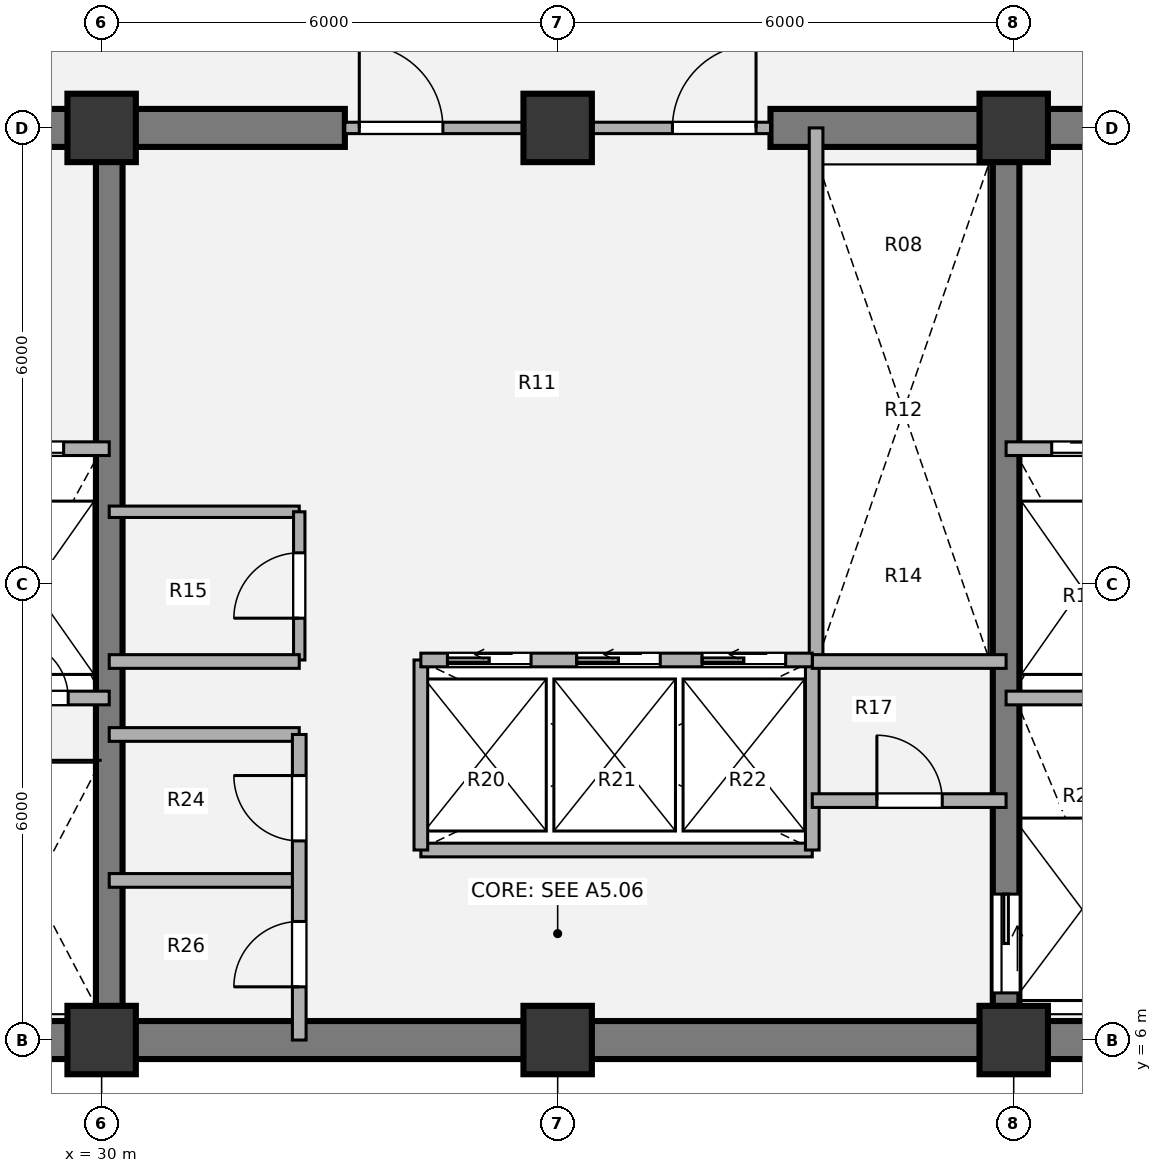
"""IFC4 building model, lengths in metres.
Left out: names, types, materials, properties, quantities, classifications, styles, units other than length and angle.
Written with IfcOpenShell. Run it as: python <this file> out.ifc"""

import sys

from ifc_helpers import new_model, si_unit, direction, frame, frame_2d, origin, origin_2d, place, context, subcontext, project, spatial, rectangle, extrude, source, transform, mapped, element, fill, save


model = new_model("IFC4")
c1 = context("Model", 3, precision=1e-05, world=origin(), true_north=direction((0.0, 1.0)))
c2 = subcontext(c1, "Body", "Model", "MODEL_VIEW")
j1 = project(units=[si_unit("LENGTHUNIT", "METRE"), si_unit("PLANEANGLEUNIT", "RADIAN")], contexts=[c1])
p1 = place(None, origin())
s1 = spatial("IfcSite", under=j1, at=p1, CompositionType="ELEMENT")
p2 = place(p1, origin())
s2 = spatial("IfcBuilding", under=s1, at=p2, CompositionType="ELEMENT")
p3 = place(p2, frame((0.0, 0.0, 120.06)))
s3 = spatial("IfcBuildingStorey", under=s2, at=p3, CompositionType="ELEMENT", Elevation=120.06)
m1 = source(origin(), c2, "Body", "SweptSolid", [
    extrude(rectangle(XDim=0.9, YDim=0.9, at=origin_2d()), origin(), (0.0, 0.0, 1.0), 3.78),
])
for number, where, z_axis, x_axis in (
    (1, (30.0, 6.0, 0.0), (0.0, 0.0, 1.0), (1.0, 0.0, 0.0)),
    (2, (36.0, 6.0, 0.0), (0.0, 0.0, 1.0), (1.0, 0.0, 0.0)),
    (3, (42.0, 6.0, 0.0), (0.0, 0.0, 1.0), (1.0, 0.0, 0.0)),
    (4, (30.0, 18.0, 0.0), (0.0, 0.0, 1.0), (1.0, 0.0, 0.0)),
    (5, (36.0, 18.0, 0.0), (0.0, 0.0, 1.0), (1.0, 0.0, 0.0)),
    (6, (42.0, 18.0, 0.0), (0.0, 0.0, 1.0), (1.0, 0.0, 0.0)),
):
    element("IfcColumn", number, at=place(p3, frame(where, z_axis=z_axis, x_axis=x_axis)), inside=s3, PredefinedType="COLUMN", context=c2, shape_type="MappedRepresentation", body=[
        mapped(m1, transform((0.0, 0.0, 0.0), x_axis=(1.0, 0.0, 0.0), y_axis=(0.0, 1.0, 0.0), z_axis=(0.0, 0.0, 1.0), scale=1.0)),
    ])
p4 = place(p3, frame((48.25, 6.0, 0.0), z_axis=(0.0, 0.0, 1.0), x_axis=(-1.0, 0.0, 0.0)))
e7 = element("IfcWall", 7, at=p4, inside=s3, PredefinedType="SHEAR", context=c2, shape_type="SweptSolid", body=[
    extrude(rectangle(XDim=24.5, YDim=0.5, at=frame_2d((12.25, 0.0))), origin(), (0.0, 0.0, 1.0), 3.78),
])
p5 = place(p3, frame((23.75, 18.0, 0.0), z_axis=(0.0, 0.0, 1.0), x_axis=(1.0, 0.0, 0.0)))
e8 = element("IfcWall", 8, at=p5, inside=s3, PredefinedType="SHEAR", context=c2, shape_type="SweptSolid", body=[
    extrude(rectangle(XDim=9.45, YDim=0.5, at=frame_2d((4.725, 0.0))), origin(), (0.0, 0.0, 1.0), 3.78),
])
p6 = place(p5, frame((2.95, 0.0, 0.0)))
e9 = element("IfcOpeningElement", 9, at=p6, cuts=e8, PredefinedType="OPENING", context=c2, shape_type="SweptSolid", body=[
    extrude(rectangle(XDim=1.1, YDim=2.1, at=origin_2d()), frame((0.55, 0.26, 1.05), z_axis=(0.0, -1.0, 0.0), x_axis=(1.0, 0.0, 0.0)), (0.0, 0.0, 1.0), 0.52),
])
p7 = place(p3, frame((38.8, 18.0, 0.0), z_axis=(0.0, 0.0, 1.0), x_axis=(1.0, 0.0, 0.0)))
e10 = element("IfcWall", 10, at=p7, inside=s3, PredefinedType="SHEAR", context=c2, shape_type="SweptSolid", body=[
    extrude(rectangle(XDim=9.45, YDim=0.5, at=frame_2d((4.725, 0.0))), origin(), (0.0, 0.0, 1.0), 3.78),
])
p8 = place(p7, frame((5.45, 0.0, 0.0)))
e11 = element("IfcOpeningElement", 11, at=p8, cuts=e10, PredefinedType="OPENING", context=c2, shape_type="SweptSolid", body=[
    extrude(rectangle(XDim=1.1, YDim=2.1, at=origin_2d()), frame((0.55, 0.26, 1.05), z_axis=(0.0, -1.0, 0.0), x_axis=(1.0, 0.0, 0.0)), (0.0, 0.0, 1.0), 0.52),
])
p9 = place(p3, frame((30.1, 6.0, 0.0), z_axis=(0.0, 0.0, 1.0), x_axis=(0.0, 1.0, 0.0)))
e12 = element("IfcWall", 12, at=p9, inside=s3, PredefinedType="SHEAR", context=c2, shape_type="SweptSolid", body=[
    extrude(rectangle(XDim=12.0, YDim=0.35, at=frame_2d((6.0, 0.0))), origin(), (0.0, 0.0, 1.0), 3.78),
])
p10 = place(p3, frame((41.9, 18.0, 0.0), z_axis=(0.0, 0.0, 1.0), x_axis=(0.0, -1.0, 0.0)))
e13 = element("IfcWall", 13, at=p10, inside=s3, PredefinedType="SHEAR", context=c2, shape_type="SweptSolid", body=[
    extrude(rectangle(XDim=12.0, YDim=0.35, at=frame_2d((6.0, 0.0))), origin(), (0.0, 0.0, 1.0), 3.78),
])
p11 = place(p10, frame((10.08, 0.0, 0.0)))
e14 = element("IfcOpeningElement", 14, at=p11, cuts=e13, PredefinedType="OPENING", context=c2, shape_type="SweptSolid", body=[
    extrude(rectangle(XDim=1.3, YDim=2.1, at=origin_2d()), frame((0.65, 0.185, 1.05), z_axis=(0.0, -1.0, 0.0), x_axis=(1.0, 0.0, 0.0)), (0.0, 0.0, 1.0), 0.37),
])
p12 = place(p3, frame((30.1, 12.95, 0.0), z_axis=(0.0, 0.0, 1.0), x_axis=(1.0, 0.0, 0.0)))
e15 = element("IfcWall", 15, at=p12, inside=s3, PredefinedType="PARTITIONING", context=c2, shape_type="SweptSolid", body=[
    extrude(rectangle(XDim=2.5, YDim=0.15, at=frame_2d((1.25, 0.0))), origin(), (0.0, 0.0, 1.0), 3.5),
])
p13 = place(p3, frame((32.6, 11.0, 0.0), z_axis=(0.0, 0.0, 1.0), x_axis=(0.0, 1.0, 0.0)))
e16 = element("IfcWall", 16, at=p13, inside=s3, PredefinedType="PARTITIONING", context=c2, shape_type="SweptSolid", body=[
    extrude(rectangle(XDim=1.95, YDim=0.15, at=frame_2d((0.975, 0.0))), origin(), (0.0, 0.0, 1.0), 3.5),
])
p14 = place(p13, frame((0.55, 0.0, 0.0)))
e17 = element("IfcOpeningElement", 17, at=p14, cuts=e16, PredefinedType="OPENING", context=c2, shape_type="SweptSolid", body=[
    extrude(rectangle(XDim=0.86, YDim=2.1, at=origin_2d()), frame((0.43, 0.085, 1.05), z_axis=(0.0, -1.0, 0.0), x_axis=(1.0, 0.0, 0.0)), (0.0, 0.0, 1.0), 0.17),
])
p15 = place(p3, frame((34.2, 8.5, 0.0), z_axis=(0.0, 0.0, 1.0), x_axis=(1.0, 0.0, 0.0)))
e18 = element("IfcWall", 18, at=p15, inside=s3, PredefinedType="PARTITIONING", context=c2, shape_type="SweptSolid", body=[
    extrude(rectangle(XDim=5.15, YDim=0.18, at=frame_2d((2.575, 0.0))), origin(), (0.0, 0.0, 1.0), 3.5),
])
for number, where, z_axis, x_axis in (
    (19, (34.2, 8.5, 0.0), (0.0, 0.0, 1.0), (0.0, 1.0, 0.0)),
    (20, (39.35, 8.5, 0.0), (0.0, 0.0, 1.0), (0.0, 1.0, 0.0)),
):
    element("IfcWall", number, at=place(p3, frame(where, z_axis=z_axis, x_axis=x_axis)), inside=s3, PredefinedType="PARTITIONING", context=c2, shape_type="SweptSolid", body=[
        extrude(rectangle(XDim=2.5, YDim=0.18, at=frame_2d((1.25, 0.0))), origin(), (0.0, 0.0, 1.0), 3.5),
    ])
p16 = place(p3, frame((39.4, 11.0, 0.0), z_axis=(0.0, 0.0, 1.0), x_axis=(0.0, 1.0, 0.0)))
e21 = element("IfcWall", 21, at=p16, inside=s3, PredefinedType="PARTITIONING", context=c2, shape_type="SweptSolid", body=[
    extrude(rectangle(XDim=7.0, YDim=0.18, at=frame_2d((3.5, 0.0))), origin(), (0.0, 0.0, 1.0), 3.5),
])
p17 = place(p3, frame((30.1, 10.98, 0.0), z_axis=(0.0, 0.0, 1.0), x_axis=(1.0, 0.0, 0.0)))
e22 = element("IfcWall", 22, at=p17, inside=s3, PredefinedType="PARTITIONING", context=c2, shape_type="SweptSolid", body=[
    extrude(rectangle(XDim=2.5, YDim=0.18, at=frame_2d((1.25, 0.0))), origin(), (0.0, 0.0, 1.0), 3.5),
])
p18 = place(p3, frame((39.35, 10.98, 0.0), z_axis=(0.0, 0.0, 1.0), x_axis=(1.0, 0.0, 0.0)))
e23 = element("IfcWall", 23, at=p18, inside=s3, PredefinedType="PARTITIONING", context=c2, shape_type="SweptSolid", body=[
    extrude(rectangle(XDim=2.55, YDim=0.18, at=frame_2d((1.275, 0.0))), origin(), (0.0, 0.0, 1.0), 3.5),
])
for number, where, z_axis, x_axis in (
    (24, (30.1, 8.1, 0.0), (0.0, 0.0, 1.0), (1.0, 0.0, 0.0)),
    (25, (30.1, 10.02, 0.0), (0.0, 0.0, 1.0), (1.0, 0.0, 0.0)),
):
    element("IfcWall", number, at=place(p3, frame(where, z_axis=z_axis, x_axis=x_axis)), inside=s3, PredefinedType="PARTITIONING", context=c2, shape_type="SweptSolid", body=[
        extrude(rectangle(XDim=2.5, YDim=0.18, at=frame_2d((1.25, 0.0))), origin(), (0.0, 0.0, 1.0), 3.5),
    ])
p19 = place(p3, frame((32.6, 6.0, 0.0), z_axis=(0.0, 0.0, 1.0), x_axis=(0.0, 1.0, 0.0)))
e26 = element("IfcWall", 26, at=p19, inside=s3, PredefinedType="PARTITIONING", context=c2, shape_type="SweptSolid", body=[
    extrude(rectangle(XDim=4.02, YDim=0.18, at=frame_2d((2.01, 0.0))), origin(), (0.0, 0.0, 1.0), 3.5),
])
p20 = place(p19, frame((0.7, 0.0, 0.0)))
e27 = element("IfcOpeningElement", 27, at=p20, cuts=e26, PredefinedType="OPENING", context=c2, shape_type="SweptSolid", body=[
    extrude(rectangle(XDim=0.86, YDim=2.1, at=origin_2d()), frame((0.43, 0.1, 1.05), z_axis=(0.0, -1.0, 0.0), x_axis=(1.0, 0.0, 0.0)), (0.0, 0.0, 1.0), 0.2),
])
p21 = place(p19, frame((2.62, 0.0, 0.0)))
e28 = element("IfcOpeningElement", 28, at=p21, cuts=e26, PredefinedType="OPENING", context=c2, shape_type="SweptSolid", body=[
    extrude(rectangle(XDim=0.86, YDim=2.1, at=origin_2d()), frame((0.43, 0.1, 1.05), z_axis=(0.0, -1.0, 0.0), x_axis=(1.0, 0.0, 0.0)), (0.0, 0.0, 1.0), 0.2),
])
p22 = place(p3, frame((39.35, 9.15, 0.0), z_axis=(0.0, 0.0, 1.0), x_axis=(1.0, 0.0, 0.0)))
e29 = element("IfcWall", 29, at=p22, inside=s3, PredefinedType="PARTITIONING", context=c2, shape_type="SweptSolid", body=[
    extrude(rectangle(XDim=2.55, YDim=0.18, at=frame_2d((1.275, 0.0))), origin(), (0.0, 0.0, 1.0), 3.5),
])
p23 = place(p22, frame((0.85, 0.0, 0.0)))
e30 = element("IfcOpeningElement", 30, at=p23, cuts=e29, PredefinedType="OPENING", context=c2, shape_type="SweptSolid", body=[
    extrude(rectangle(XDim=0.86, YDim=2.1, at=origin_2d()), frame((0.43, 0.1, 1.05), z_axis=(0.0, -1.0, 0.0), x_axis=(1.0, 0.0, 0.0)), (0.0, 0.0, 1.0), 0.2),
])
p24 = place(p3, frame((33.2, 18.0, 0.0), z_axis=(0.0, 0.0, 1.0), x_axis=(1.0, 0.0, 0.0)))
e31 = element("IfcWall", 31, at=p24, inside=s3, PredefinedType="PARTITIONING", context=c2, shape_type="SweptSolid", body=[
    extrude(rectangle(XDim=5.6, YDim=0.15, at=frame_2d((2.8, 0.0))), origin(), (0.0, 0.0, 1.0), 2.315),
])
p25 = place(p24, frame((0.19, 0.0, 0.0)))
e32 = element("IfcOpeningElement", 32, at=p25, cuts=e31, PredefinedType="OPENING", context=c2, shape_type="SweptSolid", body=[
    extrude(rectangle(XDim=1.1, YDim=2.1, at=origin_2d()), frame((0.55, 0.085, 1.05), z_axis=(0.0, -1.0, 0.0), x_axis=(1.0, 0.0, 0.0)), (0.0, 0.0, 1.0), 0.17),
])
p26 = place(p24, frame((4.31, 0.0, 0.0)))
e33 = element("IfcOpeningElement", 33, at=p26, cuts=e31, PredefinedType="OPENING", context=c2, shape_type="SweptSolid", body=[
    extrude(rectangle(XDim=1.1, YDim=2.1, at=origin_2d()), frame((0.55, 0.085, 1.05), z_axis=(0.0, -1.0, 0.0), x_axis=(1.0, 0.0, 0.0)), (0.0, 0.0, 1.0), 0.17),
])
p27 = place(p3, frame((24.0, 13.78, 0.0), z_axis=(0.0, 0.0, 1.0), x_axis=(1.0, 0.0, 0.0)))
e34 = element("IfcWall", 34, at=p27, inside=s3, PredefinedType="PARTITIONING", context=c2, shape_type="SweptSolid", body=[
    extrude(rectangle(XDim=6.1, YDim=0.18, at=frame_2d((3.05, 0.0))), origin(), (0.0, 0.0, 1.0), 3.5),
])
p28 = place(p27, frame((1.15, 0.0, 0.0)))
e35 = element("IfcOpeningElement", 35, at=p28, cuts=e34, PredefinedType="OPENING", context=c2, shape_type="SweptSolid", body=[
    extrude(rectangle(XDim=1.1, YDim=2.1, at=origin_2d()), frame((0.55, 0.1, 1.05), z_axis=(0.0, -1.0, 0.0), x_axis=(1.0, 0.0, 0.0)), (0.0, 0.0, 1.0), 0.2),
])
p29 = place(p27, frame((4.4, 0.0, 0.0)))
e36 = element("IfcOpeningElement", 36, at=p29, cuts=e34, PredefinedType="OPENING", context=c2, shape_type="SweptSolid", body=[
    extrude(rectangle(XDim=1.1, YDim=2.1, at=origin_2d()), frame((0.55, 0.1, 1.05), z_axis=(0.0, -1.0, 0.0), x_axis=(1.0, 0.0, 0.0)), (0.0, 0.0, 1.0), 0.2),
])
p30 = place(p3, frame((28.15, 10.5, 0.0), z_axis=(0.0, 0.0, 1.0), x_axis=(1.0, 0.0, 0.0)))
e37 = element("IfcWall", 37, at=p30, inside=s3, PredefinedType="PARTITIONING", context=c2, shape_type="SweptSolid", body=[
    extrude(rectangle(XDim=1.95, YDim=0.18, at=frame_2d((0.975, 0.0))), origin(), (0.0, 0.0, 1.0), 3.5),
])
p31 = place(p30, frame((0.65, 0.0, 0.0)))
e38 = element("IfcOpeningElement", 38, at=p31, cuts=e37, PredefinedType="OPENING", context=c2, shape_type="SweptSolid", body=[
    extrude(rectangle(XDim=0.76, YDim=2.05, at=origin_2d()), frame((0.38, 0.1, 1.025), z_axis=(0.0, -1.0, 0.0), x_axis=(1.0, 0.0, 0.0)), (0.0, 0.0, 1.0), 0.2),
])
p32 = place(p3, frame((41.9, 13.78, 0.0), z_axis=(0.0, 0.0, 1.0), x_axis=(1.0, 0.0, 0.0)))
e39 = element("IfcWall", 39, at=p32, inside=s3, PredefinedType="PARTITIONING", context=c2, shape_type="SweptSolid", body=[
    extrude(rectangle(XDim=6.1, YDim=0.18, at=frame_2d((3.05, 0.0))), origin(), (0.0, 0.0, 1.0), 3.5),
])
p33 = place(p32, frame((0.6, 0.0, 0.0)))
e40 = element("IfcOpeningElement", 40, at=p33, cuts=e39, PredefinedType="OPENING", context=c2, shape_type="SweptSolid", body=[
    extrude(rectangle(XDim=1.1, YDim=2.1, at=origin_2d()), frame((0.55, 0.1, 1.05), z_axis=(0.0, -1.0, 0.0), x_axis=(1.0, 0.0, 0.0)), (0.0, 0.0, 1.0), 0.2),
])
p34 = place(p32, frame((3.8, 0.0, 0.0)))
e41 = element("IfcOpeningElement", 41, at=p34, cuts=e39, PredefinedType="OPENING", context=c2, shape_type="SweptSolid", body=[
    extrude(rectangle(XDim=1.1, YDim=2.1, at=origin_2d()), frame((0.55, 0.1, 1.05), z_axis=(0.0, -1.0, 0.0), x_axis=(1.0, 0.0, 0.0)), (0.0, 0.0, 1.0), 0.2),
])
p35 = place(p3, frame((41.9, 10.5, 0.0), z_axis=(0.0, 0.0, 1.0), x_axis=(1.0, 0.0, 0.0)))
e42 = element("IfcWall", 42, at=p35, inside=s3, PredefinedType="PARTITIONING", context=c2, shape_type="SweptSolid", body=[
    extrude(rectangle(XDim=1.95, YDim=0.18, at=frame_2d((0.975, 0.0))), origin(), (0.0, 0.0, 1.0), 3.5),
])
p36 = place(p3, frame((34.2, 11.0, 0.0), z_axis=(0.0, 0.0, 1.0), x_axis=(1.0, 0.0, 0.0)))
e43 = element("IfcWall", 43, at=p36, inside=s3, PredefinedType="PARTITIONING", context=c2, shape_type="SweptSolid", body=[
    extrude(rectangle(XDim=5.15, YDim=0.18, at=frame_2d((2.575, 0.0))), origin(), (0.0, 0.0, 1.0), 3.5),
])
p37 = place(p36, frame((0.35, 0.0, 0.0)))
e44 = element("IfcOpeningElement", 44, at=p37, cuts=e43, PredefinedType="OPENING", context=c2, shape_type="SweptSolid", body=[
    extrude(rectangle(XDim=1.1, YDim=2.1, at=origin_2d()), frame((0.55, 0.1, 1.05), z_axis=(0.0, -1.0, 0.0), x_axis=(1.0, 0.0, 0.0)), (0.0, 0.0, 1.0), 0.2),
])
p38 = place(p36, frame((2.05, 0.0, 0.0)))
e45 = element("IfcOpeningElement", 45, at=p38, cuts=e43, PredefinedType="OPENING", context=c2, shape_type="SweptSolid", body=[
    extrude(rectangle(XDim=1.1, YDim=2.1, at=origin_2d()), frame((0.55, 0.1, 1.05), z_axis=(0.0, -1.0, 0.0), x_axis=(1.0, 0.0, 0.0)), (0.0, 0.0, 1.0), 0.2),
])
p39 = place(p36, frame((3.7, 0.0, 0.0)))
e46 = element("IfcOpeningElement", 46, at=p39, cuts=e43, PredefinedType="OPENING", context=c2, shape_type="SweptSolid", body=[
    extrude(rectangle(XDim=1.1, YDim=2.1, at=origin_2d()), frame((0.55, 0.1, 1.05), z_axis=(0.0, -1.0, 0.0), x_axis=(1.0, 0.0, 0.0)), (0.0, 0.0, 1.0), 0.2),
])
m2 = source(origin(), c2, "Body", "SweptSolid", [
    extrude(rectangle(XDim=0.86, YDim=2.1, at=origin_2d()), frame((0.43, 0.025, 1.05), z_axis=(0.0, -1.0, 0.0), x_axis=(1.0, 0.0, 0.0)), (0.0, 0.0, 1.0), 0.05),
])
p40 = place(p14, origin())
e47 = element("IfcDoor", 47, at=p40, inside=s3, OperationType="SINGLE_SWING_LEFT", PredefinedType="DOOR", context=c2, shape_type="MappedRepresentation", body=[
    mapped(m2, transform((0.0, 0.0, 0.0), x_axis=(1.0, 0.0, 0.0), y_axis=(0.0, 1.0, 0.0), z_axis=(0.0, 0.0, 1.0), scale=1.0)),
])
fill(e17, e47)
p41 = place(p20, origin())
e48 = element("IfcDoor", 48, at=p41, inside=s3, OperationType="SINGLE_SWING_LEFT", PredefinedType="DOOR", context=c2, shape_type="MappedRepresentation", body=[
    mapped(m2, transform((0.0, 0.0, 0.0), x_axis=(1.0, 0.0, 0.0), y_axis=(0.0, 1.0, 0.0), z_axis=(0.0, 0.0, 1.0), scale=1.0)),
])
fill(e27, e48)
p42 = place(p21, origin())
e49 = element("IfcDoor", 49, at=p42, inside=s3, OperationType="SINGLE_SWING_RIGHT", PredefinedType="DOOR", context=c2, shape_type="MappedRepresentation", body=[
    mapped(m2, transform((0.0, 0.0, 0.0), x_axis=(1.0, 0.0, 0.0), y_axis=(0.0, 1.0, 0.0), z_axis=(0.0, 0.0, 1.0), scale=1.0)),
])
fill(e28, e49)
p43 = place(p23, origin())
e50 = element("IfcDoor", 50, at=p43, inside=s3, OperationType="SINGLE_SWING_LEFT", PredefinedType="DOOR", context=c2, shape_type="MappedRepresentation", body=[
    mapped(m2, transform((0.0, 0.0, 0.0), x_axis=(1.0, 0.0, 0.0), y_axis=(0.0, 1.0, 0.0), z_axis=(0.0, 0.0, 1.0), scale=1.0)),
])
fill(e30, e50)
m3 = source(origin(), c2, "Body", "SweptSolid", [
    extrude(rectangle(XDim=1.1, YDim=2.1, at=origin_2d()), frame((0.55, 0.025, 1.05), z_axis=(0.0, -1.0, 0.0), x_axis=(1.0, 0.0, 0.0)), (0.0, 0.0, 1.0), 0.05),
])
p44 = place(p25, origin())
e51 = element("IfcDoor", 51, at=p44, inside=s3, OperationType="SINGLE_SWING_LEFT", PredefinedType="DOOR", context=c2, shape_type="MappedRepresentation", body=[
    mapped(m3, transform((0.0, 0.0, 0.0), x_axis=(1.0, 0.0, 0.0), y_axis=(0.0, 1.0, 0.0), z_axis=(0.0, 0.0, 1.0), scale=1.0)),
])
fill(e32, e51)
p45 = place(p26, origin())
e52 = element("IfcDoor", 52, at=p45, inside=s3, OperationType="SINGLE_SWING_RIGHT", PredefinedType="DOOR", context=c2, shape_type="MappedRepresentation", body=[
    mapped(m3, transform((0.0, 0.0, 0.0), x_axis=(1.0, 0.0, 0.0), y_axis=(0.0, 1.0, 0.0), z_axis=(0.0, 0.0, 1.0), scale=1.0)),
])
fill(e33, e52)
m4 = source(origin(), c2, "Body", "SweptSolid", [
    extrude(rectangle(XDim=1.1, YDim=2.1, at=origin_2d()), frame((0.55, 0.025, 1.05), z_axis=(0.0, -1.0, 0.0), x_axis=(1.0, 0.0, 0.0)), (0.0, 0.0, 1.0), 0.05),
])
p46 = place(p29, origin())
e53 = element("IfcDoor", 53, at=p46, inside=s3, OperationType="SLIDING_TO_LEFT", PredefinedType="DOOR", context=c2, shape_type="MappedRepresentation", body=[
    mapped(m4, transform((0.0, 0.0, 0.0), x_axis=(1.0, 0.0, 0.0), y_axis=(0.0, 1.0, 0.0), z_axis=(0.0, 0.0, 1.0), scale=1.0)),
])
fill(e36, e53)
m5 = source(origin(), c2, "Body", "SweptSolid", [
    extrude(rectangle(XDim=0.76, YDim=2.05, at=origin_2d()), frame((0.38, 0.025, 1.025), z_axis=(0.0, -1.0, 0.0), x_axis=(1.0, 0.0, 0.0)), (0.0, 0.0, 1.0), 0.05),
])
p47 = place(p31, origin())
e54 = element("IfcDoor", 54, at=p47, inside=s3, OperationType="SINGLE_SWING_LEFT", PredefinedType="DOOR", context=c2, shape_type="MappedRepresentation", body=[
    mapped(m5, transform((0.0, 0.0, 0.0), x_axis=(1.0, 0.0, 0.0), y_axis=(0.0, 1.0, 0.0), z_axis=(0.0, 0.0, 1.0), scale=1.0)),
])
fill(e38, e54)
p48 = place(p33, origin())
e55 = element("IfcDoor", 55, at=p48, inside=s3, OperationType="SLIDING_TO_RIGHT", PredefinedType="DOOR", context=c2, shape_type="MappedRepresentation", body=[
    mapped(m4, transform((0.0, 0.0, 0.0), x_axis=(1.0, 0.0, 0.0), y_axis=(0.0, 1.0, 0.0), z_axis=(0.0, 0.0, 1.0), scale=1.0)),
])
fill(e40, e55)
m6 = source(origin(), c2, "Body", "SweptSolid", [
    extrude(rectangle(XDim=1.3, YDim=2.1, at=origin_2d()), frame((0.65, 0.025, 1.05), z_axis=(0.0, -1.0, 0.0), x_axis=(1.0, 0.0, 0.0)), (0.0, 0.0, 1.0), 0.05),
])
p49 = place(p11, origin())
e56 = element("IfcDoor", 56, at=p49, inside=s3, OperationType="SLIDING_TO_LEFT", PredefinedType="DOOR", context=c2, shape_type="MappedRepresentation", body=[
    mapped(m6, transform((0.0, 0.0, 0.0), x_axis=(1.0, 0.0, 0.0), y_axis=(0.0, 1.0, 0.0), z_axis=(0.0, 0.0, 1.0), scale=1.0)),
])
fill(e14, e56)
p50 = place(p37, origin())
e57 = element("IfcDoor", 57, at=p50, inside=s3, OperationType="SLIDING_TO_LEFT", PredefinedType="DOOR", context=c2, shape_type="MappedRepresentation", body=[
    mapped(m4, transform((0.0, 0.0, 0.0), x_axis=(1.0, 0.0, 0.0), y_axis=(0.0, 1.0, 0.0), z_axis=(0.0, 0.0, 1.0), scale=1.0)),
])
fill(e44, e57)
p51 = place(p38, origin())
e58 = element("IfcDoor", 58, at=p51, inside=s3, OperationType="SLIDING_TO_LEFT", PredefinedType="DOOR", context=c2, shape_type="MappedRepresentation", body=[
    mapped(m4, transform((0.0, 0.0, 0.0), x_axis=(1.0, 0.0, 0.0), y_axis=(0.0, 1.0, 0.0), z_axis=(0.0, 0.0, 1.0), scale=1.0)),
])
fill(e45, e58)
p52 = place(p39, origin())
e59 = element("IfcDoor", 59, at=p52, inside=s3, OperationType="SLIDING_TO_LEFT", PredefinedType="DOOR", context=c2, shape_type="MappedRepresentation", body=[
    mapped(m4, transform((0.0, 0.0, 0.0), x_axis=(1.0, 0.0, 0.0), y_axis=(0.0, 1.0, 0.0), z_axis=(0.0, 0.0, 1.0), scale=1.0)),
])
fill(e46, e59)
save(model, sys.argv[1])
